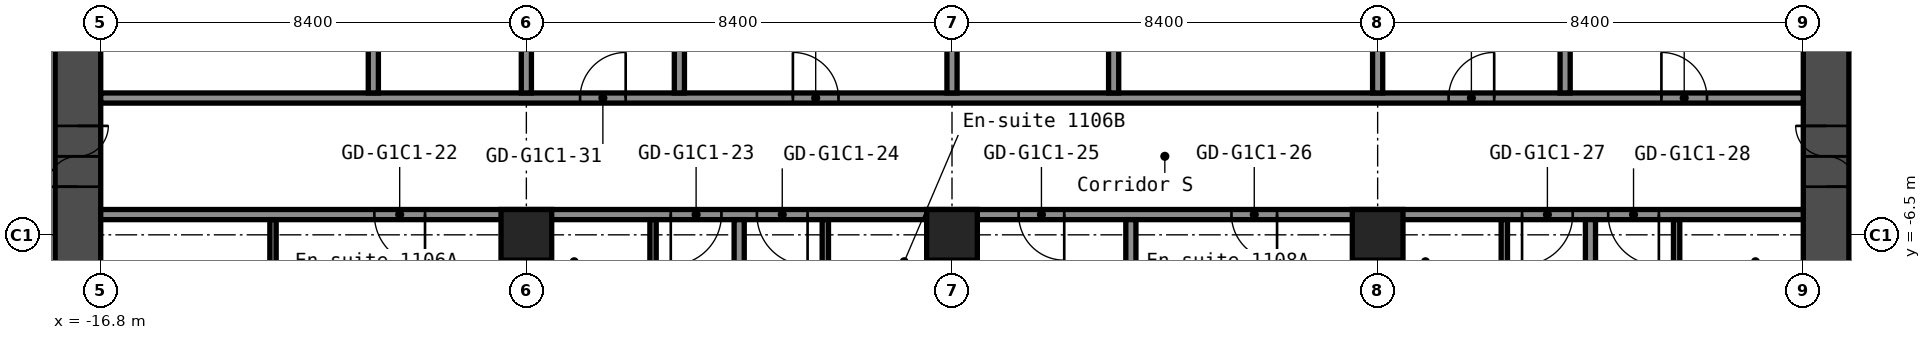
"""IFC4 building model, lengths in metres.
Left out: names, types, materials, properties, quantities, classifications, styles, units other than length and angle.
Written with IfcOpenShell. Run it as: python <this file> out.ifc"""

import sys

from ifc_helpers import new_model, si_unit, direction, frame, frame_2d, origin, origin_2d, place, context, subcontext, project, spatial, rectangle, hollow_rectangle, extrude, element, fill, save


model = new_model("IFC4")
c1 = context("Model", 3, precision=1e-05, world=origin(), true_north=direction((0.0, 1.0)))
c2 = subcontext(c1, "Body", "Model", "MODEL_VIEW")
j1 = project(units=[si_unit("LENGTHUNIT", "METRE"), si_unit("PLANEANGLEUNIT", "RADIAN")], contexts=[c1])
p1 = place(None, origin())
s1 = spatial("IfcSite", under=j1, at=p1, CompositionType="ELEMENT")
p2 = place(p1, origin())
s2 = spatial("IfcBuilding", under=s1, at=p2, CompositionType="ELEMENT")
p3 = place(p2, frame((0.0, 0.0, 42.2)))
s3 = spatial("IfcBuildingStorey", under=s2, at=p3, CompositionType="ELEMENT", Elevation=42.2)
for number, where, z_axis, x_axis in (
    (1, (-8.4, -6.5, 0.0), (0.0, 0.0, 1.0), (1.0, 0.0, 0.0)),
    (2, (0.0, -6.5, 0.0), (0.0, 0.0, 1.0), (1.0, 0.0, 0.0)),
    (3, (8.4, -6.5, 0.0), (0.0, 0.0, 1.0), (1.0, 0.0, 0.0)),
):
    element("IfcColumn", number, at=place(p3, frame(where, z_axis=z_axis, x_axis=x_axis)), inside=s3, PredefinedType="COLUMN", context=c2, shape_type="SweptSolid", body=[
        extrude(hollow_rectangle(XDim=1.0, YDim=1.0, WallThickness=0.04, at=origin_2d()), origin(), (0.0, 0.0, 1.0), 2.8),
    ])
p4 = place(p3, frame((-17.25, -8.4, 0.0), z_axis=(0.0, 0.0, 1.0), x_axis=(0.0, 1.0, 0.0)))
e4 = element("IfcWall", 4, at=p4, inside=s3, PredefinedType="SHEAR", context=c2, shape_type="SweptSolid", body=[
    extrude(rectangle(XDim=16.8, YDim=0.9, at=frame_2d((8.4, 0.0))), origin(), (0.0, 0.0, 1.0), 2.8),
])
p5 = place(p4, frame((12.75, 0.0, 0.0)))
e5 = element("IfcOpeningElement", 5, at=p5, cuts=e4, PredefinedType="OPENING", context=c2, shape_type="SweptSolid", body=[
    extrude(rectangle(XDim=1.2, YDim=2.1, at=frame_2d((0.6, 1.05))), frame((0.0, 0.46, 0.0), z_axis=(0.0, -1.0, 0.0), x_axis=(1.0, 0.0, 0.0)), (0.0, 0.0, 1.0), 0.92),
])
p6 = place(p4, frame((2.85, 0.0, 0.0)))
e6 = element("IfcOpeningElement", 6, at=p6, cuts=e4, PredefinedType="OPENING", context=c2, shape_type="SweptSolid", body=[
    extrude(rectangle(XDim=1.2, YDim=2.1, at=frame_2d((0.6, 1.05))), frame((0.0, 0.46, 0.0), z_axis=(0.0, -1.0, 0.0), x_axis=(1.0, 0.0, 0.0)), (0.0, 0.0, 1.0), 0.92),
])
p7 = place(p3, frame((17.25, -8.4, 0.0), z_axis=(0.0, 0.0, 1.0), x_axis=(0.0, 1.0, 0.0)))
e7 = element("IfcWall", 7, at=p7, inside=s3, PredefinedType="SHEAR", context=c2, shape_type="SweptSolid", body=[
    extrude(rectangle(XDim=16.8, YDim=0.9, at=frame_2d((8.4, 0.0))), origin(), (0.0, 0.0, 1.0), 2.8),
])
p8 = place(p7, frame((12.75, 0.0, 0.0)))
e8 = element("IfcOpeningElement", 8, at=p8, cuts=e7, PredefinedType="OPENING", context=c2, shape_type="SweptSolid", body=[
    extrude(rectangle(XDim=1.2, YDim=2.1, at=frame_2d((0.6, 1.05))), frame((0.0, 0.46, 0.0), z_axis=(0.0, -1.0, 0.0), x_axis=(1.0, 0.0, 0.0)), (0.0, 0.0, 1.0), 0.92),
])
p9 = place(p7, frame((2.85, 0.0, 0.0)))
e9 = element("IfcOpeningElement", 9, at=p9, cuts=e7, PredefinedType="OPENING", context=c2, shape_type="SweptSolid", body=[
    extrude(rectangle(XDim=1.2, YDim=2.1, at=frame_2d((0.6, 1.05))), frame((0.0, 0.46, 0.0), z_axis=(0.0, -1.0, 0.0), x_axis=(1.0, 0.0, 0.0)), (0.0, 0.0, 1.0), 0.92),
])
p10 = place(p3, frame((-16.8, -6.1, 0.0), z_axis=(0.0, 0.0, 1.0), x_axis=(1.0, 0.0, 0.0)))
e10 = element("IfcWall", 10, at=p10, inside=s3, PredefinedType="PARTITIONING", context=c2, shape_type="SweptSolid", body=[
    extrude(rectangle(XDim=33.6, YDim=0.2, at=frame_2d((16.8, 0.0))), origin(), (0.0, 0.0, 1.0), 2.8),
])
p11 = place(p10, frame((5.4, 0.0, 0.0)))
e11 = element("IfcOpeningElement", 11, at=p11, cuts=e10, PredefinedType="OPENING", context=c2, shape_type="SweptSolid", body=[
    extrude(rectangle(XDim=1.0, YDim=2.1, at=frame_2d((0.5, 1.05))), frame((0.0, 0.11, 0.0), z_axis=(0.0, -1.0, 0.0), x_axis=(1.0, 0.0, 0.0)), (0.0, 0.0, 1.0), 0.22),
])
p12 = place(p10, frame((11.25, 0.0, 0.0)))
e12 = element("IfcOpeningElement", 12, at=p12, cuts=e10, PredefinedType="OPENING", context=c2, shape_type="SweptSolid", body=[
    extrude(rectangle(XDim=1.0, YDim=2.1, at=frame_2d((0.5, 1.05))), frame((0.0, 0.11, 0.0), z_axis=(0.0, -1.0, 0.0), x_axis=(1.0, 0.0, 0.0)), (0.0, 0.0, 1.0), 0.22),
])
p13 = place(p10, frame((12.95, 0.0, 0.0)))
e13 = element("IfcOpeningElement", 13, at=p13, cuts=e10, PredefinedType="OPENING", context=c2, shape_type="SweptSolid", body=[
    extrude(rectangle(XDim=1.0, YDim=2.1, at=frame_2d((0.5, 1.05))), frame((0.0, 0.11, 0.0), z_axis=(0.0, -1.0, 0.0), x_axis=(1.0, 0.0, 0.0)), (0.0, 0.0, 1.0), 0.22),
])
p14 = place(p10, frame((18.115, 0.0, 0.0)))
e14 = element("IfcOpeningElement", 14, at=p14, cuts=e10, PredefinedType="OPENING", context=c2, shape_type="SweptSolid", body=[
    extrude(rectangle(XDim=0.9, YDim=2.1, at=frame_2d((0.45, 1.05))), frame((0.0, 0.11, 0.0), z_axis=(0.0, -1.0, 0.0), x_axis=(1.0, 0.0, 0.0)), (0.0, 0.0, 1.0), 0.22),
])
p15 = place(p10, frame((22.315, 0.0, 0.0)))
e15 = element("IfcOpeningElement", 15, at=p15, cuts=e10, PredefinedType="OPENING", context=c2, shape_type="SweptSolid", body=[
    extrude(rectangle(XDim=0.9, YDim=2.1, at=frame_2d((0.45, 1.05))), frame((0.0, 0.11, 0.0), z_axis=(0.0, -1.0, 0.0), x_axis=(1.0, 0.0, 0.0)), (0.0, 0.0, 1.0), 0.22),
])
p16 = place(p10, frame((28.05, 0.0, 0.0)))
e16 = element("IfcOpeningElement", 16, at=p16, cuts=e10, PredefinedType="OPENING", context=c2, shape_type="SweptSolid", body=[
    extrude(rectangle(XDim=1.0, YDim=2.1, at=frame_2d((0.5, 1.05))), frame((0.0, 0.11, 0.0), z_axis=(0.0, -1.0, 0.0), x_axis=(1.0, 0.0, 0.0)), (0.0, 0.0, 1.0), 0.22),
])
p17 = place(p10, frame((29.75, 0.0, 0.0)))
e17 = element("IfcOpeningElement", 17, at=p17, cuts=e10, PredefinedType="OPENING", context=c2, shape_type="SweptSolid", body=[
    extrude(rectangle(XDim=1.0, YDim=2.1, at=frame_2d((0.5, 1.05))), frame((0.0, 0.11, 0.0), z_axis=(0.0, -1.0, 0.0), x_axis=(1.0, 0.0, 0.0)), (0.0, 0.0, 1.0), 0.22),
])
p18 = place(p3, frame((-16.8, -3.8, 0.0), z_axis=(0.0, 0.0, 1.0), x_axis=(1.0, 0.0, 0.0)))
e18 = element("IfcWall", 18, at=p18, inside=s3, PredefinedType="PARTITIONING", context=c2, shape_type="SweptSolid", body=[
    extrude(rectangle(XDim=33.6, YDim=0.2, at=frame_2d((16.8, 0.0))), origin(), (0.0, 0.0, 1.0), 2.8),
])
p19 = place(p18, frame((9.46, 0.0, 0.0)))
e19 = element("IfcOpeningElement", 19, at=p19, cuts=e18, PredefinedType="OPENING", context=c2, shape_type="SweptSolid", body=[
    extrude(rectangle(XDim=0.9, YDim=2.1, at=frame_2d((0.45, 1.05))), frame((0.0, 0.11, 0.0), z_axis=(0.0, -1.0, 0.0), x_axis=(1.0, 0.0, 0.0)), (0.0, 0.0, 1.0), 0.22),
])
p20 = place(p18, frame((13.66, 0.0, 0.0)))
e20 = element("IfcOpeningElement", 20, at=p20, cuts=e18, PredefinedType="OPENING", context=c2, shape_type="SweptSolid", body=[
    extrude(rectangle(XDim=0.9, YDim=2.1, at=frame_2d((0.45, 1.05))), frame((0.0, 0.11, 0.0), z_axis=(0.0, -1.0, 0.0), x_axis=(1.0, 0.0, 0.0)), (0.0, 0.0, 1.0), 0.22),
])
p21 = place(p18, frame((26.6, 0.0, 0.0)))
e21 = element("IfcOpeningElement", 21, at=p21, cuts=e18, PredefinedType="OPENING", context=c2, shape_type="SweptSolid", body=[
    extrude(rectangle(XDim=0.9, YDim=2.1, at=frame_2d((0.45, 1.05))), frame((0.0, 0.11, 0.0), z_axis=(0.0, -1.0, 0.0), x_axis=(1.0, 0.0, 0.0)), (0.0, 0.0, 1.0), 0.22),
])
p22 = place(p18, frame((30.8, 0.0, 0.0)))
e22 = element("IfcOpeningElement", 22, at=p22, cuts=e18, PredefinedType="OPENING", context=c2, shape_type="SweptSolid", body=[
    extrude(rectangle(XDim=0.9, YDim=2.1, at=frame_2d((0.45, 1.05))), frame((0.0, 0.11, 0.0), z_axis=(0.0, -1.0, 0.0), x_axis=(1.0, 0.0, 0.0)), (0.0, 0.0, 1.0), 0.22),
])
p23 = place(p3, frame((-13.4, -9.5, 0.0), z_axis=(0.0, 0.0, 1.0), x_axis=(0.0, 1.0, 0.0)))
e23 = element("IfcWall", 23, at=p23, inside=s3, PredefinedType="PARTITIONING", context=c2, shape_type="SweptSolid", body=[
    extrude(rectangle(XDim=3.3, YDim=0.125, at=frame_2d((1.65, 0.0))), origin(), (0.0, 0.0, 1.0), 2.8),
])
p24 = place(p3, frame((-11.42, -3.7, 0.0), z_axis=(0.0, 0.0, 1.0), x_axis=(0.0, 1.0, 0.0)))
e24 = element("IfcWall", 24, at=p24, inside=s3, PredefinedType="PARTITIONING", context=c2, shape_type="SweptSolid", body=[
    extrude(rectangle(XDim=7.4, YDim=0.2, at=frame_2d((3.7, 0.0))), origin(), (0.0, 0.0, 1.0), 2.8),
])
p25 = place(p3, frame((-8.4, -20.3, 0.0), z_axis=(0.0, 0.0, 1.0), x_axis=(0.0, 1.0, 0.0)))
e25 = element("IfcWall", 25, at=p25, inside=s3, PredefinedType="PARTITIONING", context=c2, shape_type="SweptSolid", body=[
    extrude(rectangle(XDim=13.31, YDim=0.2, at=frame_2d((6.655, 0.0))), origin(), (0.0, 0.0, 1.0), 2.8),
])
p26 = place(p3, frame((-8.4, -3.7, 0.0), z_axis=(0.0, 0.0, 1.0), x_axis=(0.0, 1.0, 0.0)))
e26 = element("IfcWall", 26, at=p26, inside=s3, PredefinedType="PARTITIONING", context=c2, shape_type="SweptSolid", body=[
    extrude(rectangle(XDim=7.4, YDim=0.2, at=frame_2d((3.7, 0.0))), origin(), (0.0, 0.0, 1.0), 2.8),
])
p27 = place(p3, frame((-5.9, -9.1, 0.0), z_axis=(0.0, 0.0, 1.0), x_axis=(0.0, 1.0, 0.0)))
e27 = element("IfcWall", 27, at=p27, inside=s3, PredefinedType="PARTITIONING", context=c2, shape_type="SweptSolid", body=[
    extrude(rectangle(XDim=2.9, YDim=0.125, at=frame_2d((1.45, 0.0))), origin(), (0.0, 0.0, 1.0), 2.8),
])
p28 = place(p27, frame((0.6, 0.0, 0.0)))
e28 = element("IfcOpeningElement", 28, at=p28, cuts=e27, PredefinedType="OPENING", context=c2, shape_type="SweptSolid", body=[
    extrude(rectangle(XDim=0.8, YDim=2.1, at=frame_2d((0.4, 1.05))), frame((0.0, 0.073, 0.0), z_axis=(0.0, -1.0, 0.0), x_axis=(1.0, 0.0, 0.0)), (0.0, 0.0, 1.0), 0.145),
])
p29 = place(p3, frame((-5.38, -3.7, 0.0), z_axis=(0.0, 0.0, 1.0), x_axis=(0.0, 1.0, 0.0)))
e29 = element("IfcWall", 29, at=p29, inside=s3, PredefinedType="PARTITIONING", context=c2, shape_type="SweptSolid", body=[
    extrude(rectangle(XDim=7.4, YDim=0.2, at=frame_2d((3.7, 0.0))), origin(), (0.0, 0.0, 1.0), 2.8),
])
p30 = place(p3, frame((-4.2, -20.3, 0.0), z_axis=(0.0, 0.0, 1.0), x_axis=(0.0, 1.0, 0.0)))
e30 = element("IfcWall", 30, at=p30, inside=s3, PredefinedType="PARTITIONING", context=c2, shape_type="SweptSolid", body=[
    extrude(rectangle(XDim=14.1, YDim=0.2, at=frame_2d((7.05, 0.0))), origin(), (0.0, 0.0, 1.0), 2.8),
])
p31 = place(p3, frame((-2.5, -9.1, 0.0), z_axis=(0.0, 0.0, 1.0), x_axis=(0.0, 1.0, 0.0)))
e31 = element("IfcWall", 31, at=p31, inside=s3, PredefinedType="PARTITIONING", context=c2, shape_type="SweptSolid", body=[
    extrude(rectangle(XDim=2.9, YDim=0.125, at=frame_2d((1.45, 0.0))), origin(), (0.0, 0.0, 1.0), 2.8),
])
p32 = place(p31, frame((0.6, 0.0, 0.0)))
e32 = element("IfcOpeningElement", 32, at=p32, cuts=e31, PredefinedType="OPENING", context=c2, shape_type="SweptSolid", body=[
    extrude(rectangle(XDim=0.8, YDim=2.1, at=frame_2d((0.4, 1.05))), frame((0.0, 0.073, 0.0), z_axis=(0.0, -1.0, 0.0), x_axis=(1.0, 0.0, 0.0)), (0.0, 0.0, 1.0), 0.145),
])
p33 = place(p3, frame((0.0, -20.3, 0.0), z_axis=(0.0, 0.0, 1.0), x_axis=(0.0, 1.0, 0.0)))
e33 = element("IfcWall", 33, at=p33, inside=s3, PredefinedType="PARTITIONING", context=c2, shape_type="SweptSolid", body=[
    extrude(rectangle(XDim=13.31, YDim=0.2, at=frame_2d((6.655, 0.0))), origin(), (0.0, 0.0, 1.0), 2.8),
])
for number, where, z_axis, x_axis in (
    (34, (0.0, -3.7, 0.0), (0.0, 0.0, 1.0), (0.0, 1.0, 0.0)),
    (35, (3.19, -3.7, 0.0), (0.0, 0.0, 1.0), (0.0, 1.0, 0.0)),
):
    element("IfcWall", number, at=place(p3, frame(where, z_axis=z_axis, x_axis=x_axis)), inside=s3, PredefinedType="PARTITIONING", context=c2, shape_type="SweptSolid", body=[
        extrude(rectangle(XDim=7.4, YDim=0.2, at=frame_2d((3.7, 0.0))), origin(), (0.0, 0.0, 1.0), 2.8),
    ])
p34 = place(p3, frame((3.53, -20.3, 0.0), z_axis=(0.0, 0.0, 1.0), x_axis=(0.0, 1.0, 0.0)))
e36 = element("IfcWall", 36, at=p34, inside=s3, PredefinedType="PARTITIONING", context=c2, shape_type="SweptSolid", body=[
    extrude(rectangle(XDim=14.1, YDim=0.2, at=frame_2d((7.05, 0.0))), origin(), (0.0, 0.0, 1.0), 2.8),
])
p35 = place(p3, frame((8.4, -20.3, 0.0), z_axis=(0.0, 0.0, 1.0), x_axis=(0.0, 1.0, 0.0)))
e37 = element("IfcWall", 37, at=p35, inside=s3, PredefinedType="PARTITIONING", context=c2, shape_type="SweptSolid", body=[
    extrude(rectangle(XDim=13.31, YDim=0.2, at=frame_2d((6.655, 0.0))), origin(), (0.0, 0.0, 1.0), 2.8),
])
p36 = place(p3, frame((8.4, -3.7, 0.0), z_axis=(0.0, 0.0, 1.0), x_axis=(0.0, 1.0, 0.0)))
e38 = element("IfcWall", 38, at=p36, inside=s3, PredefinedType="PARTITIONING", context=c2, shape_type="SweptSolid", body=[
    extrude(rectangle(XDim=7.4, YDim=0.2, at=frame_2d((3.7, 0.0))), origin(), (0.0, 0.0, 1.0), 2.8),
])
p37 = place(p3, frame((10.9, -9.1, 0.0), z_axis=(0.0, 0.0, 1.0), x_axis=(0.0, 1.0, 0.0)))
e39 = element("IfcWall", 39, at=p37, inside=s3, PredefinedType="PARTITIONING", context=c2, shape_type="SweptSolid", body=[
    extrude(rectangle(XDim=2.9, YDim=0.125, at=frame_2d((1.45, 0.0))), origin(), (0.0, 0.0, 1.0), 2.8),
])
p38 = place(p37, frame((0.6, 0.0, 0.0)))
e40 = element("IfcOpeningElement", 40, at=p38, cuts=e39, PredefinedType="OPENING", context=c2, shape_type="SweptSolid", body=[
    extrude(rectangle(XDim=0.8, YDim=2.1, at=frame_2d((0.4, 1.05))), frame((0.0, 0.073, 0.0), z_axis=(0.0, -1.0, 0.0), x_axis=(1.0, 0.0, 0.0)), (0.0, 0.0, 1.0), 0.145),
])
p39 = place(p3, frame((12.1, -3.7, 0.0), z_axis=(0.0, 0.0, 1.0), x_axis=(0.0, 1.0, 0.0)))
e41 = element("IfcWall", 41, at=p39, inside=s3, PredefinedType="PARTITIONING", context=c2, shape_type="SweptSolid", body=[
    extrude(rectangle(XDim=7.4, YDim=0.2, at=frame_2d((3.7, 0.0))), origin(), (0.0, 0.0, 1.0), 2.8),
])
p40 = place(p3, frame((12.6, -20.3, 0.0), z_axis=(0.0, 0.0, 1.0), x_axis=(0.0, 1.0, 0.0)))
e42 = element("IfcWall", 42, at=p40, inside=s3, PredefinedType="PARTITIONING", context=c2, shape_type="SweptSolid", body=[
    extrude(rectangle(XDim=14.1, YDim=0.2, at=frame_2d((7.05, 0.0))), origin(), (0.0, 0.0, 1.0), 2.8),
])
p41 = place(p3, frame((14.3, -9.1, 0.0), z_axis=(0.0, 0.0, 1.0), x_axis=(0.0, 1.0, 0.0)))
e43 = element("IfcWall", 43, at=p41, inside=s3, PredefinedType="PARTITIONING", context=c2, shape_type="SweptSolid", body=[
    extrude(rectangle(XDim=2.9, YDim=0.125, at=frame_2d((1.45, 0.0))), origin(), (0.0, 0.0, 1.0), 2.8),
])
p42 = place(p41, frame((0.6, 0.0, 0.0)))
e44 = element("IfcOpeningElement", 44, at=p42, cuts=e43, PredefinedType="OPENING", context=c2, shape_type="SweptSolid", body=[
    extrude(rectangle(XDim=0.8, YDim=2.1, at=frame_2d((0.4, 1.05))), frame((0.0, 0.073, 0.0), z_axis=(0.0, -1.0, 0.0), x_axis=(1.0, 0.0, 0.0)), (0.0, 0.0, 1.0), 0.145),
])
p43 = place(p6, origin())
e45 = element("IfcDoor", 45, at=p43, inside=s3, OperationType="DOUBLE_DOOR_SINGLE_SWING", PredefinedType="DOOR", context=c2, shape_type="SweptSolid", body=[
    extrude(rectangle(XDim=1.2, YDim=2.1, at=frame_2d((0.6, 1.05))), frame((0.0, 0.025, 0.0), z_axis=(0.0, -1.0, 0.0), x_axis=(1.0, 0.0, 0.0)), (0.0, 0.0, 1.0), 0.05),
])
fill(e6, e45)
p44 = place(p9, origin())
e46 = element("IfcDoor", 46, at=p44, inside=s3, OperationType="DOUBLE_DOOR_SINGLE_SWING", PredefinedType="DOOR", context=c2, shape_type="SweptSolid", body=[
    extrude(rectangle(XDim=1.2, YDim=2.1, at=frame_2d((0.6, 1.05))), frame((0.0, 0.025, 0.0), z_axis=(0.0, -1.0, 0.0), x_axis=(1.0, 0.0, 0.0)), (0.0, 0.0, 1.0), 0.05),
])
fill(e9, e46)
p45 = place(p11, origin())
e47 = element("IfcDoor", 47, at=p45, inside=s3, OperationType="SINGLE_SWING_RIGHT", PredefinedType="DOOR", context=c2, shape_type="SweptSolid", body=[
    extrude(rectangle(XDim=1.0, YDim=2.1, at=frame_2d((0.5, 1.05))), frame((0.0, 0.025, 0.0), z_axis=(0.0, -1.0, 0.0), x_axis=(1.0, 0.0, 0.0)), (0.0, 0.0, 1.0), 0.05),
])
fill(e11, e47)
p46 = place(p12, origin())
e48 = element("IfcDoor", 48, at=p46, inside=s3, OperationType="SINGLE_SWING_LEFT", PredefinedType="DOOR", context=c2, shape_type="SweptSolid", body=[
    extrude(rectangle(XDim=1.0, YDim=2.1, at=frame_2d((0.5, 1.05))), frame((0.0, 0.025, 0.0), z_axis=(0.0, -1.0, 0.0), x_axis=(1.0, 0.0, 0.0)), (0.0, 0.0, 1.0), 0.05),
])
fill(e12, e48)
p47 = place(p13, origin())
e49 = element("IfcDoor", 49, at=p47, inside=s3, OperationType="SINGLE_SWING_RIGHT", PredefinedType="DOOR", context=c2, shape_type="SweptSolid", body=[
    extrude(rectangle(XDim=1.0, YDim=2.1, at=frame_2d((0.5, 1.05))), frame((0.0, 0.025, 0.0), z_axis=(0.0, -1.0, 0.0), x_axis=(1.0, 0.0, 0.0)), (0.0, 0.0, 1.0), 0.05),
])
fill(e13, e49)
p48 = place(p14, origin())
e50 = element("IfcDoor", 50, at=p48, inside=s3, OperationType="SINGLE_SWING_RIGHT", PredefinedType="DOOR", context=c2, shape_type="SweptSolid", body=[
    extrude(rectangle(XDim=0.9, YDim=2.1, at=frame_2d((0.45, 1.05))), frame((0.0, 0.025, 0.0), z_axis=(0.0, -1.0, 0.0), x_axis=(1.0, 0.0, 0.0)), (0.0, 0.0, 1.0), 0.05),
])
fill(e14, e50)
p49 = place(p15, origin())
e51 = element("IfcDoor", 51, at=p49, inside=s3, OperationType="SINGLE_SWING_RIGHT", PredefinedType="DOOR", context=c2, shape_type="SweptSolid", body=[
    extrude(rectangle(XDim=0.9, YDim=2.1, at=frame_2d((0.45, 1.05))), frame((0.0, 0.025, 0.0), z_axis=(0.0, -1.0, 0.0), x_axis=(1.0, 0.0, 0.0)), (0.0, 0.0, 1.0), 0.05),
])
fill(e15, e51)
p50 = place(p16, origin())
e52 = element("IfcDoor", 52, at=p50, inside=s3, OperationType="SINGLE_SWING_LEFT", PredefinedType="DOOR", context=c2, shape_type="SweptSolid", body=[
    extrude(rectangle(XDim=1.0, YDim=2.1, at=frame_2d((0.5, 1.05))), frame((0.0, 0.025, 0.0), z_axis=(0.0, -1.0, 0.0), x_axis=(1.0, 0.0, 0.0)), (0.0, 0.0, 1.0), 0.05),
])
fill(e16, e52)
p51 = place(p17, origin())
e53 = element("IfcDoor", 53, at=p51, inside=s3, OperationType="SINGLE_SWING_RIGHT", PredefinedType="DOOR", context=c2, shape_type="SweptSolid", body=[
    extrude(rectangle(XDim=1.0, YDim=2.1, at=frame_2d((0.5, 1.05))), frame((0.0, 0.025, 0.0), z_axis=(0.0, -1.0, 0.0), x_axis=(1.0, 0.0, 0.0)), (0.0, 0.0, 1.0), 0.05),
])
fill(e17, e53)
p52 = place(p19, origin())
e54 = element("IfcDoor", 54, at=p52, inside=s3, OperationType="SINGLE_SWING_LEFT", PredefinedType="DOOR", context=c2, shape_type="SweptSolid", body=[
    extrude(rectangle(XDim=0.9, YDim=2.1, at=frame_2d((0.45, 1.05))), frame((0.0, 0.025, 0.0), z_axis=(0.0, -1.0, 0.0), x_axis=(1.0, 0.0, 0.0)), (0.0, 0.0, 1.0), 0.05),
])
fill(e19, e54)
p53 = place(p20, origin())
e55 = element("IfcDoor", 55, at=p53, inside=s3, OperationType="SINGLE_SWING_RIGHT", PredefinedType="DOOR", context=c2, shape_type="SweptSolid", body=[
    extrude(rectangle(XDim=0.9, YDim=2.1, at=frame_2d((0.45, 1.05))), frame((0.0, 0.025, 0.0), z_axis=(0.0, -1.0, 0.0), x_axis=(1.0, 0.0, 0.0)), (0.0, 0.0, 1.0), 0.05),
])
fill(e20, e55)
p54 = place(p21, origin())
e56 = element("IfcDoor", 56, at=p54, inside=s3, OperationType="SINGLE_SWING_LEFT", PredefinedType="DOOR", context=c2, shape_type="SweptSolid", body=[
    extrude(rectangle(XDim=0.9, YDim=2.1, at=frame_2d((0.45, 1.05))), frame((0.0, 0.025, 0.0), z_axis=(0.0, -1.0, 0.0), x_axis=(1.0, 0.0, 0.0)), (0.0, 0.0, 1.0), 0.05),
])
fill(e21, e56)
p55 = place(p22, origin())
e57 = element("IfcDoor", 57, at=p55, inside=s3, OperationType="SINGLE_SWING_RIGHT", PredefinedType="DOOR", context=c2, shape_type="SweptSolid", body=[
    extrude(rectangle(XDim=0.9, YDim=2.1, at=frame_2d((0.45, 1.05))), frame((0.0, 0.025, 0.0), z_axis=(0.0, -1.0, 0.0), x_axis=(1.0, 0.0, 0.0)), (0.0, 0.0, 1.0), 0.05),
])
fill(e22, e57)
save(model, sys.argv[1])
